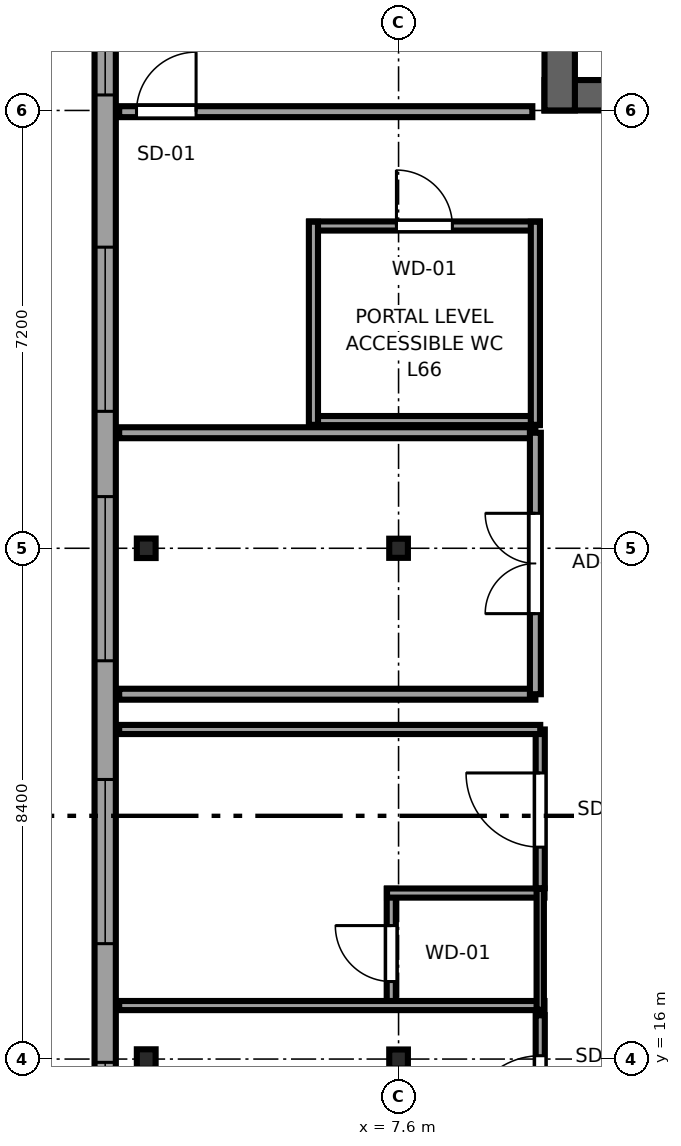
"""IFC4 building model, lengths in metres.
Left out: names, types, materials, properties, quantities, classifications, styles, units other than length and angle.
Written with IfcOpenShell. Run it as: python <this file> out.ifc"""

import sys

from ifc_helpers import new_model, si_unit, direction, frame, frame_2d, origin, origin_2d, place, context, subcontext, project, spatial, rectangle, i_section, extrude, source, transform, mapped, element, fill, save


model = new_model("IFC4")
c1 = context("Model", 3, precision=1e-05, world=origin(), true_north=direction((0.0, 1.0)))
c2 = subcontext(c1, "Body", "Model", "MODEL_VIEW")
j1 = project(units=[si_unit("LENGTHUNIT", "METRE"), si_unit("PLANEANGLEUNIT", "RADIAN")], contexts=[c1])
p1 = place(None, origin())
s1 = spatial("IfcSite", under=j1, at=p1, CompositionType="ELEMENT")
p2 = place(p1, origin())
s2 = spatial("IfcBuilding", under=s1, at=p2, CompositionType="ELEMENT")
p3 = place(p2, frame((0.0, 0.0, 248.75)))
s3 = spatial("IfcBuildingStorey", under=s2, at=p3, CompositionType="ELEMENT", Elevation=248.75)
p4 = place(p3, frame((10.0, 31.85, 0.0), z_axis=(0.0, 0.0, 1.0), x_axis=(1.0, 0.0, 0.0)))
e1 = element("IfcWall", 1, at=p4, inside=s3, PredefinedType="SHEAR", context=c2, shape_type="SweptSolid", body=[
    extrude(rectangle(XDim=26.0, YDim=0.5, at=frame_2d((13.0, 0.0))), origin(), (0.0, 0.0, 1.0), 3.55),
])
p5 = place(p4, frame((7.45, 0.0, 0.0), z_axis=(0.0, 0.0, 1.0), x_axis=(-1.0, 0.0, 0.0)))
e2 = element("IfcOpeningElement", 2, at=p5, cuts=e1, PredefinedType="OPENING", context=c2, shape_type="SweptSolid", body=[
    extrude(rectangle(XDim=1.5, YDim=2.04, at=frame_2d((0.75, 1.02))), frame((0.0, 0.26, 0.0), z_axis=(0.0, -1.0, 0.0), x_axis=(1.0, 0.0, 0.0)), (0.0, 0.0, 1.0), 0.52),
])
p6 = place(p4, frame((13.75, 0.0, 0.0), z_axis=(0.0, 0.0, 1.0), x_axis=(-1.0, 0.0, 0.0)))
e3 = element("IfcOpeningElement", 3, at=p6, cuts=e1, PredefinedType="OPENING", context=c2, shape_type="SweptSolid", body=[
    extrude(rectangle(XDim=1.5, YDim=2.04, at=frame_2d((0.75, 1.02))), frame((0.0, 0.26, 0.0), z_axis=(0.0, -1.0, 0.0), x_axis=(1.0, 0.0, 0.0)), (0.0, 0.0, 1.0), 0.52),
])
p7 = place(p4, frame((20.05, 0.0, 0.0), z_axis=(0.0, 0.0, 1.0), x_axis=(-1.0, 0.0, 0.0)))
e4 = element("IfcOpeningElement", 4, at=p7, cuts=e1, PredefinedType="OPENING", context=c2, shape_type="SweptSolid", body=[
    extrude(rectangle(XDim=1.5, YDim=2.04, at=frame_2d((0.75, 1.02))), frame((0.0, 0.26, 0.0), z_axis=(0.0, -1.0, 0.0), x_axis=(1.0, 0.0, 0.0)), (0.0, 0.0, 1.0), 0.52),
])
p8 = place(p3, frame((10.25, 31.6, 0.0), z_axis=(0.0, 0.0, 1.0), x_axis=(0.0, 1.0, 0.0)))
e5 = element("IfcWall", 5, at=p8, inside=s3, PredefinedType="SHEAR", context=c2, shape_type="SweptSolid", body=[
    extrude(rectangle(XDim=13.6, YDim=0.5, at=frame_2d((6.8, 0.0))), origin(), (0.0, 0.0, 1.0), 3.55),
])
m1 = source(origin(), c2, "Body", "SweptSolid", [
    extrude(i_section(OverallWidth=0.309, OverallDepth=0.321, WebThickness=0.014, FlangeThickness=0.022, FilletRadius=0.017, at=origin_2d()), origin(), (0.0, 0.0, 1.0), 3.55),
])
p9 = place(p3, frame((3.45, 16.0, 0.0), z_axis=(0.0, 0.0, 1.0), x_axis=(1.0, 0.0, 0.0)))
e6 = element("IfcColumn", 6, at=p9, inside=s3, PredefinedType="COLUMN", context=c2, shape_type="MappedRepresentation", body=[
    mapped(m1, transform((0.0, 0.0, 0.0), x_axis=(1.0, 0.0, 0.0), y_axis=(0.0, 1.0, 0.0), z_axis=(0.0, 0.0, 1.0), scale=1.0)),
])
m2 = source(origin(), c2, "Body", "SweptSolid", [
    extrude(i_section(OverallWidth=0.307, OverallDepth=0.315, WebThickness=0.012, FlangeThickness=0.019, FilletRadius=0.017, at=origin_2d()), origin(), (0.0, 0.0, 1.0), 3.55),
])
p10 = place(p3, frame((7.6, 16.0, 0.0), z_axis=(0.0, 0.0, 1.0), x_axis=(1.0, 0.0, 0.0)))
e7 = element("IfcColumn", 7, at=p10, inside=s3, PredefinedType="COLUMN", context=c2, shape_type="MappedRepresentation", body=[
    mapped(m2, transform((0.0, 0.0, 0.0), x_axis=(1.0, 0.0, 0.0), y_axis=(0.0, 1.0, 0.0), z_axis=(0.0, 0.0, 1.0), scale=1.0)),
])
p11 = place(p3, frame((3.45, 24.4, 0.0), z_axis=(0.0, 0.0, 1.0), x_axis=(1.0, 0.0, 0.0)))
e8 = element("IfcColumn", 8, at=p11, inside=s3, PredefinedType="COLUMN", context=c2, shape_type="MappedRepresentation", body=[
    mapped(m1, transform((0.0, 0.0, 0.0), x_axis=(1.0, 0.0, 0.0), y_axis=(0.0, 1.0, 0.0), z_axis=(0.0, 0.0, 1.0), scale=1.0)),
])
p12 = place(p3, frame((7.6, 24.4, 0.0), z_axis=(0.0, 0.0, 1.0), x_axis=(1.0, 0.0, 0.0)))
e9 = element("IfcColumn", 9, at=p12, inside=s3, PredefinedType="COLUMN", context=c2, shape_type="MappedRepresentation", body=[
    mapped(m2, transform((0.0, 0.0, 0.0), x_axis=(1.0, 0.0, 0.0), y_axis=(0.0, 1.0, 0.0), z_axis=(0.0, 0.0, 1.0), scale=1.0)),
])
p13 = place(p3, frame((2.775, 40.783, 0.0), z_axis=(0.0, 0.0, 1.0), x_axis=(0.0, -1.0, 0.0)))
e10 = element("IfcWall", 10, at=p13, inside=s3, PredefinedType="SOLIDWALL", context=c2, shape_type="SweptSolid", body=[
    extrude(rectangle(XDim=33.766, YDim=0.35, at=frame_2d((16.883, 0.0))), origin(), (0.0, 0.0, 1.0), 3.37),
])
p14 = place(p13, frame((1.576, 0.0, 0.68)))
e11 = element("IfcOpeningElement", 11, at=p14, cuts=e10, PredefinedType="OPENING", context=c2, shape_type="SweptSolid", body=[
    extrude(rectangle(XDim=2.7, YDim=1.95, at=frame_2d((1.35, 0.975))), frame((0.0, 0.185, 0.0), z_axis=(0.0, -1.0, 0.0), x_axis=(1.0, 0.0, 0.0)), (0.0, 0.0, 1.0), 0.37),
])
p15 = place(p13, frame((6.228, 0.0, 0.68)))
e12 = element("IfcOpeningElement", 12, at=p15, cuts=e10, PredefinedType="OPENING", context=c2, shape_type="SweptSolid", body=[
    extrude(rectangle(XDim=2.7, YDim=1.95, at=frame_2d((1.35, 0.975))), frame((0.0, 0.185, 0.0), z_axis=(0.0, -1.0, 0.0), x_axis=(1.0, 0.0, 0.0)), (0.0, 0.0, 1.0), 0.37),
])
p16 = place(p13, frame((11.431, 0.0, 0.68)))
e13 = element("IfcOpeningElement", 13, at=p16, cuts=e10, PredefinedType="OPENING", context=c2, shape_type="SweptSolid", body=[
    extrude(rectangle(XDim=2.7, YDim=1.95, at=frame_2d((1.35, 0.975))), frame((0.0, 0.185, 0.0), z_axis=(0.0, -1.0, 0.0), x_axis=(1.0, 0.0, 0.0)), (0.0, 0.0, 1.0), 0.37),
])
p17 = place(p13, frame((15.533, 0.0, 0.68)))
e14 = element("IfcOpeningElement", 14, at=p17, cuts=e10, PredefinedType="OPENING", context=c2, shape_type="SweptSolid", body=[
    extrude(rectangle(XDim=2.7, YDim=1.95, at=frame_2d((1.35, 0.975))), frame((0.0, 0.185, 0.0), z_axis=(0.0, -1.0, 0.0), x_axis=(1.0, 0.0, 0.0)), (0.0, 0.0, 1.0), 0.37),
])
p18 = place(p13, frame((20.185, 0.0, 0.68)))
e15 = element("IfcOpeningElement", 15, at=p18, cuts=e10, PredefinedType="OPENING", context=c2, shape_type="SweptSolid", body=[
    extrude(rectangle(XDim=2.7, YDim=1.95, at=frame_2d((1.35, 0.975))), frame((0.0, 0.185, 0.0), z_axis=(0.0, -1.0, 0.0), x_axis=(1.0, 0.0, 0.0)), (0.0, 0.0, 1.0), 0.37),
])
p19 = place(p13, frame((24.837, 0.0, 0.68)))
e16 = element("IfcOpeningElement", 16, at=p19, cuts=e10, PredefinedType="OPENING", context=c2, shape_type="SweptSolid", body=[
    extrude(rectangle(XDim=2.7, YDim=1.95, at=frame_2d((1.35, 0.975))), frame((0.0, 0.185, 0.0), z_axis=(0.0, -1.0, 0.0), x_axis=(1.0, 0.0, 0.0)), (0.0, 0.0, 1.0), 0.37),
])
p20 = place(p13, frame((29.489, 0.0, 0.68)))
e17 = element("IfcOpeningElement", 17, at=p20, cuts=e10, PredefinedType="OPENING", context=c2, shape_type="SweptSolid", body=[
    extrude(rectangle(XDim=2.7, YDim=1.95, at=frame_2d((1.35, 0.975))), frame((0.0, 0.185, 0.0), z_axis=(0.0, -1.0, 0.0), x_axis=(1.0, 0.0, 0.0)), (0.0, 0.0, 1.0), 0.37),
])
p21 = place(p3, frame((7.48, 16.81, 0.0), z_axis=(0.0, 0.0, 1.0), x_axis=(0.0, 1.0, 0.0)))
e18 = element("IfcWall", 18, at=p21, inside=s3, PredefinedType="PARTITIONING", context=c2, shape_type="SweptSolid", body=[
    extrude(rectangle(XDim=1.99, YDim=0.15, at=frame_2d((0.995, 0.0))), origin(), (0.0, 0.0, 1.0), 2.827),
])
p22 = place(p21, frame((0.465, 0.0, 0.0)))
e19 = element("IfcOpeningElement", 19, at=p22, cuts=e18, PredefinedType="OPENING", context=c2, shape_type="SweptSolid", body=[
    extrude(rectangle(XDim=0.92, YDim=2.01, at=frame_2d((0.46, 1.005))), frame((0.0, 0.085, 0.0), z_axis=(0.0, -1.0, 0.0), x_axis=(1.0, 0.0, 0.0)), (0.0, 0.0, 1.0), 0.17),
])
p23 = place(p3, frame((3.005, 16.88, 0.0), z_axis=(0.0, 0.0, 1.0), x_axis=(1.0, 0.0, 0.0)))
e20 = element("IfcWall", 20, at=p23, inside=s3, PredefinedType="PARTITIONING", context=c2, shape_type="SweptSolid", body=[
    extrude(rectangle(XDim=6.995, YDim=0.15, at=frame_2d((3.498, 0.0))), origin(), (0.0, 0.0, 1.0), 3.37),
])
p24 = place(p3, frame((7.41, 18.73, 0.0), z_axis=(0.0, 0.0, 1.0), x_axis=(1.0, 0.0, 0.0)))
e21 = element("IfcWall", 21, at=p24, inside=s3, PredefinedType="PARTITIONING", context=c2, shape_type="SweptSolid", body=[
    extrude(rectangle(XDim=2.59, YDim=0.15, at=frame_2d((1.295, 0.0))), origin(), (0.0, 0.0, 1.0), 3.37),
])
p25 = place(p3, frame((9.93, 16.81, 0.0), z_axis=(0.0, 0.0, 1.0), x_axis=(0.0, 1.0, 0.0)))
e22 = element("IfcWall", 22, at=p25, inside=s3, PredefinedType="PLUMBINGWALL", context=c2, shape_type="SweptSolid", body=[
    extrude(rectangle(XDim=1.99, YDim=0.12, at=frame_2d((0.995, 0.0))), origin(), (0.0, 0.0, 1.0), 3.37),
])
p26 = place(p3, frame((9.93, 14.21, 0.0), z_axis=(0.0, 0.0, 1.0), x_axis=(0.0, 1.0, 0.0)))
e23 = element("IfcWall", 23, at=p26, inside=s3, PredefinedType="PARTITIONING", context=c2, shape_type="SweptSolid", body=[
    extrude(rectangle(XDim=2.51, YDim=0.15, at=frame_2d((1.255, 0.0))), origin(), (0.0, 0.0, 1.0), 3.37),
])
p27 = place(p26, frame((0.625, 0.0, 0.0)))
e24 = element("IfcOpeningElement", 24, at=p27, cuts=e23, PredefinedType="OPENING", context=c2, shape_type="SweptSolid", body=[
    extrude(rectangle(XDim=1.22, YDim=2.08, at=frame_2d((0.61, 1.04))), frame((0.0, 0.085, 0.0), z_axis=(0.0, -1.0, 0.0), x_axis=(1.0, 0.0, 0.0)), (0.0, 0.0, 1.0), 0.17),
])
p28 = place(p3, frame((9.93, 18.81, 0.0), z_axis=(0.0, 0.0, 1.0), x_axis=(0.0, 1.0, 0.0)))
e25 = element("IfcWall", 25, at=p28, inside=s3, PredefinedType="PARTITIONING", context=c2, shape_type="SweptSolid", body=[
    extrude(rectangle(XDim=2.61, YDim=0.15, at=frame_2d((1.305, 0.0))), origin(), (0.0, 0.0, 1.0), 3.37),
])
p29 = place(p28, frame((0.675, 0.0, 0.0)))
e26 = element("IfcOpeningElement", 26, at=p29, cuts=e25, PredefinedType="OPENING", context=c2, shape_type="SweptSolid", body=[
    extrude(rectangle(XDim=1.22, YDim=2.08, at=frame_2d((0.61, 1.04))), frame((0.0, 0.085, 0.0), z_axis=(0.0, -1.0, 0.0), x_axis=(1.0, 0.0, 0.0)), (0.0, 0.0, 1.0), 0.17),
])
p30 = place(p3, frame((3.005, 21.42, 0.0), z_axis=(0.0, 0.0, 1.0), x_axis=(1.0, 0.0, 0.0)))
e27 = element("IfcWall", 27, at=p30, inside=s3, PredefinedType="PARTITIONING", context=c2, shape_type="SweptSolid", body=[
    extrude(rectangle(XDim=6.925, YDim=0.15, at=frame_2d((3.462, 0.0))), origin(), (0.0, 0.0, 1.0), 3.37),
])
for number, where, z_axis, x_axis in (
    (28, (3.005, 22.0, 0.0), (0.0, 0.0, 1.0), (1.0, 0.0, 0.0)),
    (29, (3.005, 26.3, 0.0), (0.0, 0.0, 1.0), (1.0, 0.0, 0.0)),
):
    element("IfcWall", number, at=place(p3, frame(where, z_axis=z_axis, x_axis=x_axis)), inside=s3, PredefinedType="PARTITIONING", context=c2, shape_type="SweptSolid", body=[
        extrude(rectangle(XDim=6.845, YDim=0.18, at=frame_2d((3.423, 0.0))), origin(), (0.0, 0.0, 1.0), 3.37),
    ])
p31 = place(p3, frame((9.85, 22.0, 0.0), z_axis=(0.0, 0.0, 1.0), x_axis=(0.0, 1.0, 0.0)))
e30 = element("IfcWall", 30, at=p31, inside=s3, PredefinedType="PARTITIONING", context=c2, shape_type="SweptSolid", body=[
    extrude(rectangle(XDim=4.3, YDim=0.18, at=frame_2d((2.15, 0.0))), origin(), (0.0, 0.0, 1.0), 3.37),
])
p32 = place(p31, frame((1.325, 0.0, 0.0)))
e31 = element("IfcOpeningElement", 31, at=p32, cuts=e30, PredefinedType="OPENING", context=c2, shape_type="SweptSolid", body=[
    extrude(rectangle(XDim=1.65, YDim=2.15, at=frame_2d((0.825, 1.075))), frame((0.0, 0.1, 0.0), z_axis=(0.0, -1.0, 0.0), x_axis=(1.0, 0.0, 0.0)), (0.0, 0.0, 1.0), 0.2),
])
p33 = place(p3, frame((6.13, 26.5, 0.0), z_axis=(0.0, 0.0, 1.0), x_axis=(1.0, 0.0, 0.0)))
e32 = element("IfcWall", 32, at=p33, inside=s3, PredefinedType="PARTITIONING", context=c2, shape_type="SweptSolid", body=[
    extrude(rectangle(XDim=3.79, YDim=0.15, at=frame_2d((1.895, 0.0))), origin(), (0.0, 0.0, 1.0), 3.37),
])
p34 = place(p3, frame((6.13, 29.7, 0.0), z_axis=(0.0, 0.0, 1.0), x_axis=(1.0, 0.0, 0.0)))
e33 = element("IfcWall", 33, at=p34, inside=s3, PredefinedType="PARTITIONING", context=c2, shape_type="SweptSolid", body=[
    extrude(rectangle(XDim=3.79, YDim=0.15, at=frame_2d((1.895, 0.0))), origin(), (0.0, 0.0, 1.0), 3.37),
])
p35 = place(p34, frame((1.435, 0.0, 0.0)))
e34 = element("IfcOpeningElement", 34, at=p35, cuts=e33, PredefinedType="OPENING", context=c2, shape_type="SweptSolid", body=[
    extrude(rectangle(XDim=0.92, YDim=2.01, at=frame_2d((0.46, 1.005))), frame((0.0, 0.085, 0.0), z_axis=(0.0, -1.0, 0.0), x_axis=(1.0, 0.0, 0.0)), (0.0, 0.0, 1.0), 0.17),
])
for number, where, z_axis, x_axis in (
    (35, (6.2, 26.43, 0.0), (0.0, 0.0, 1.0), (0.0, 1.0, 0.0)),
    (36, (9.85, 26.43, 0.0), (0.0, 0.0, 1.0), (0.0, 1.0, 0.0)),
):
    element("IfcWall", number, at=place(p3, frame(where, z_axis=z_axis, x_axis=x_axis)), inside=s3, PredefinedType="PARTITIONING", context=c2, shape_type="SweptSolid", body=[
        extrude(rectangle(XDim=3.34, YDim=0.15, at=frame_2d((1.67, 0.0))), origin(), (0.0, 0.0, 1.0), 3.37),
    ])
p36 = place(p3, frame((3.005, 31.58, 0.0), z_axis=(0.0, 0.0, 1.0), x_axis=(1.0, 0.0, 0.0)))
e37 = element("IfcWall", 37, at=p36, inside=s3, PredefinedType="PARTITIONING", context=c2, shape_type="SweptSolid", body=[
    extrude(rectangle(XDim=6.795, YDim=0.18, at=frame_2d((3.397, 0.0))), origin(), (0.0, 0.0, 1.0), 3.37),
])
p37 = place(p36, frame((0.285, 0.0, 0.0)))
e38 = element("IfcOpeningElement", 38, at=p37, cuts=e37, PredefinedType="OPENING", context=c2, shape_type="SweptSolid", body=[
    extrude(rectangle(XDim=0.98, YDim=2.12, at=frame_2d((0.49, 1.06))), frame((0.0, 0.1, 0.0), z_axis=(0.0, -1.0, 0.0), x_axis=(1.0, 0.0, 0.0)), (0.0, 0.0, 1.0), 0.2),
])
m3 = source(origin(), c2, "Body", "SweptSolid", [
    extrude(rectangle(XDim=2.7, YDim=1.95, at=frame_2d((1.35, 0.975))), frame((0.0, 0.09, 0.0), z_axis=(0.0, -1.0, 0.0), x_axis=(1.0, 0.0, 0.0)), (0.0, 0.0, 1.0), 0.06),
])
p38 = place(p15, origin())
e39 = element("IfcWindow", 39, at=p38, inside=s3, PartitioningType="TRIPLE_PANEL_HORIZONTAL", PredefinedType="WINDOW", context=c2, shape_type="MappedRepresentation", body=[
    mapped(m3, transform((0.0, 0.0, 0.0), x_axis=(1.0, 0.0, 0.0), y_axis=(0.0, 1.0, 0.0), z_axis=(0.0, 0.0, 1.0), scale=1.0)),
])
fill(e12, e39)
p39 = place(p16, origin())
e40 = element("IfcWindow", 40, at=p39, inside=s3, PartitioningType="TRIPLE_PANEL_HORIZONTAL", PredefinedType="WINDOW", context=c2, shape_type="MappedRepresentation", body=[
    mapped(m3, transform((0.0, 0.0, 0.0), x_axis=(1.0, 0.0, 0.0), y_axis=(0.0, 1.0, 0.0), z_axis=(0.0, 0.0, 1.0), scale=1.0)),
])
fill(e13, e40)
p40 = place(p17, origin())
e41 = element("IfcWindow", 41, at=p40, inside=s3, PartitioningType="TRIPLE_PANEL_HORIZONTAL", PredefinedType="WINDOW", context=c2, shape_type="MappedRepresentation", body=[
    mapped(m3, transform((0.0, 0.0, 0.0), x_axis=(1.0, 0.0, 0.0), y_axis=(0.0, 1.0, 0.0), z_axis=(0.0, 0.0, 1.0), scale=1.0)),
])
fill(e14, e41)
p41 = place(p18, origin())
e42 = element("IfcWindow", 42, at=p41, inside=s3, PartitioningType="TRIPLE_PANEL_HORIZONTAL", PredefinedType="WINDOW", context=c2, shape_type="MappedRepresentation", body=[
    mapped(m3, transform((0.0, 0.0, 0.0), x_axis=(1.0, 0.0, 0.0), y_axis=(0.0, 1.0, 0.0), z_axis=(0.0, 0.0, 1.0), scale=1.0)),
])
fill(e15, e42)
p42 = place(p19, origin())
e43 = element("IfcWindow", 43, at=p42, inside=s3, PartitioningType="TRIPLE_PANEL_HORIZONTAL", PredefinedType="WINDOW", context=c2, shape_type="MappedRepresentation", body=[
    mapped(m3, transform((0.0, 0.0, 0.0), x_axis=(1.0, 0.0, 0.0), y_axis=(0.0, 1.0, 0.0), z_axis=(0.0, 0.0, 1.0), scale=1.0)),
])
fill(e16, e43)
m4 = source(origin(), c2, "Body", "SweptSolid", [
    extrude(rectangle(XDim=0.92, YDim=2.01, at=frame_2d((0.46, 1.005))), frame((0.0, 0.025, 0.0), z_axis=(0.0, -1.0, 0.0), x_axis=(1.0, 0.0, 0.0)), (0.0, 0.0, 1.0), 0.05),
])
p43 = place(p22, origin())
e44 = element("IfcDoor", 44, at=p43, inside=s3, OperationType="SINGLE_SWING_RIGHT", PredefinedType="DOOR", context=c2, shape_type="MappedRepresentation", body=[
    mapped(m4, transform((0.0, 0.0, 0.0), x_axis=(1.0, 0.0, 0.0), y_axis=(0.0, 1.0, 0.0), z_axis=(0.0, 0.0, 1.0), scale=1.0)),
])
fill(e19, e44)
m5 = source(origin(), c2, "Body", "SweptSolid", [
    extrude(rectangle(XDim=1.22, YDim=2.08, at=frame_2d((0.61, 1.04))), frame((0.0, 0.025, 0.0), z_axis=(0.0, -1.0, 0.0), x_axis=(1.0, 0.0, 0.0)), (0.0, 0.0, 1.0), 0.05),
])
p44 = place(p27, origin())
e45 = element("IfcDoor", 45, at=p44, inside=s3, OperationType="SINGLE_SWING_LEFT", PredefinedType="DOOR", context=c2, shape_type="MappedRepresentation", body=[
    mapped(m5, transform((0.0, 0.0, 0.0), x_axis=(1.0, 0.0, 0.0), y_axis=(0.0, 1.0, 0.0), z_axis=(0.0, 0.0, 1.0), scale=1.0)),
])
fill(e24, e45)
p45 = place(p29, origin())
e46 = element("IfcDoor", 46, at=p45, inside=s3, OperationType="SINGLE_SWING_RIGHT", PredefinedType="DOOR", context=c2, shape_type="MappedRepresentation", body=[
    mapped(m5, transform((0.0, 0.0, 0.0), x_axis=(1.0, 0.0, 0.0), y_axis=(0.0, 1.0, 0.0), z_axis=(0.0, 0.0, 1.0), scale=1.0)),
])
fill(e26, e46)
m6 = source(origin(), c2, "Body", "SweptSolid", [
    extrude(rectangle(XDim=1.65, YDim=2.15, at=frame_2d((0.825, 1.075))), frame((0.0, 0.025, 0.0), z_axis=(0.0, -1.0, 0.0), x_axis=(1.0, 0.0, 0.0)), (0.0, 0.0, 1.0), 0.05),
])
p46 = place(p32, origin())
e47 = element("IfcDoor", 47, at=p46, inside=s3, OperationType="DOUBLE_DOOR_SINGLE_SWING", PredefinedType="DOOR", context=c2, shape_type="MappedRepresentation", body=[
    mapped(m6, transform((0.0, 0.0, 0.0), x_axis=(1.0, 0.0, 0.0), y_axis=(0.0, 1.0, 0.0), z_axis=(0.0, 0.0, 1.0), scale=1.0)),
])
fill(e31, e47)
p47 = place(p35, origin())
e48 = element("IfcDoor", 48, at=p47, inside=s3, OperationType="SINGLE_SWING_LEFT", PredefinedType="DOOR", context=c2, shape_type="MappedRepresentation", body=[
    mapped(m4, transform((0.0, 0.0, 0.0), x_axis=(1.0, 0.0, 0.0), y_axis=(0.0, 1.0, 0.0), z_axis=(0.0, 0.0, 1.0), scale=1.0)),
])
fill(e34, e48)
m7 = source(origin(), c2, "Body", "SweptSolid", [
    extrude(rectangle(XDim=0.98, YDim=2.12, at=frame_2d((0.49, 1.06))), frame((0.0, 0.025, 0.0), z_axis=(0.0, -1.0, 0.0), x_axis=(1.0, 0.0, 0.0)), (0.0, 0.0, 1.0), 0.05),
])
p48 = place(p37, origin())
e49 = element("IfcDoor", 49, at=p48, inside=s3, OperationType="SINGLE_SWING_RIGHT", PredefinedType="DOOR", context=c2, shape_type="MappedRepresentation", body=[
    mapped(m7, transform((0.0, 0.0, 0.0), x_axis=(1.0, 0.0, 0.0), y_axis=(0.0, 1.0, 0.0), z_axis=(0.0, 0.0, 1.0), scale=1.0)),
])
fill(e38, e49)
save(model, sys.argv[1])
